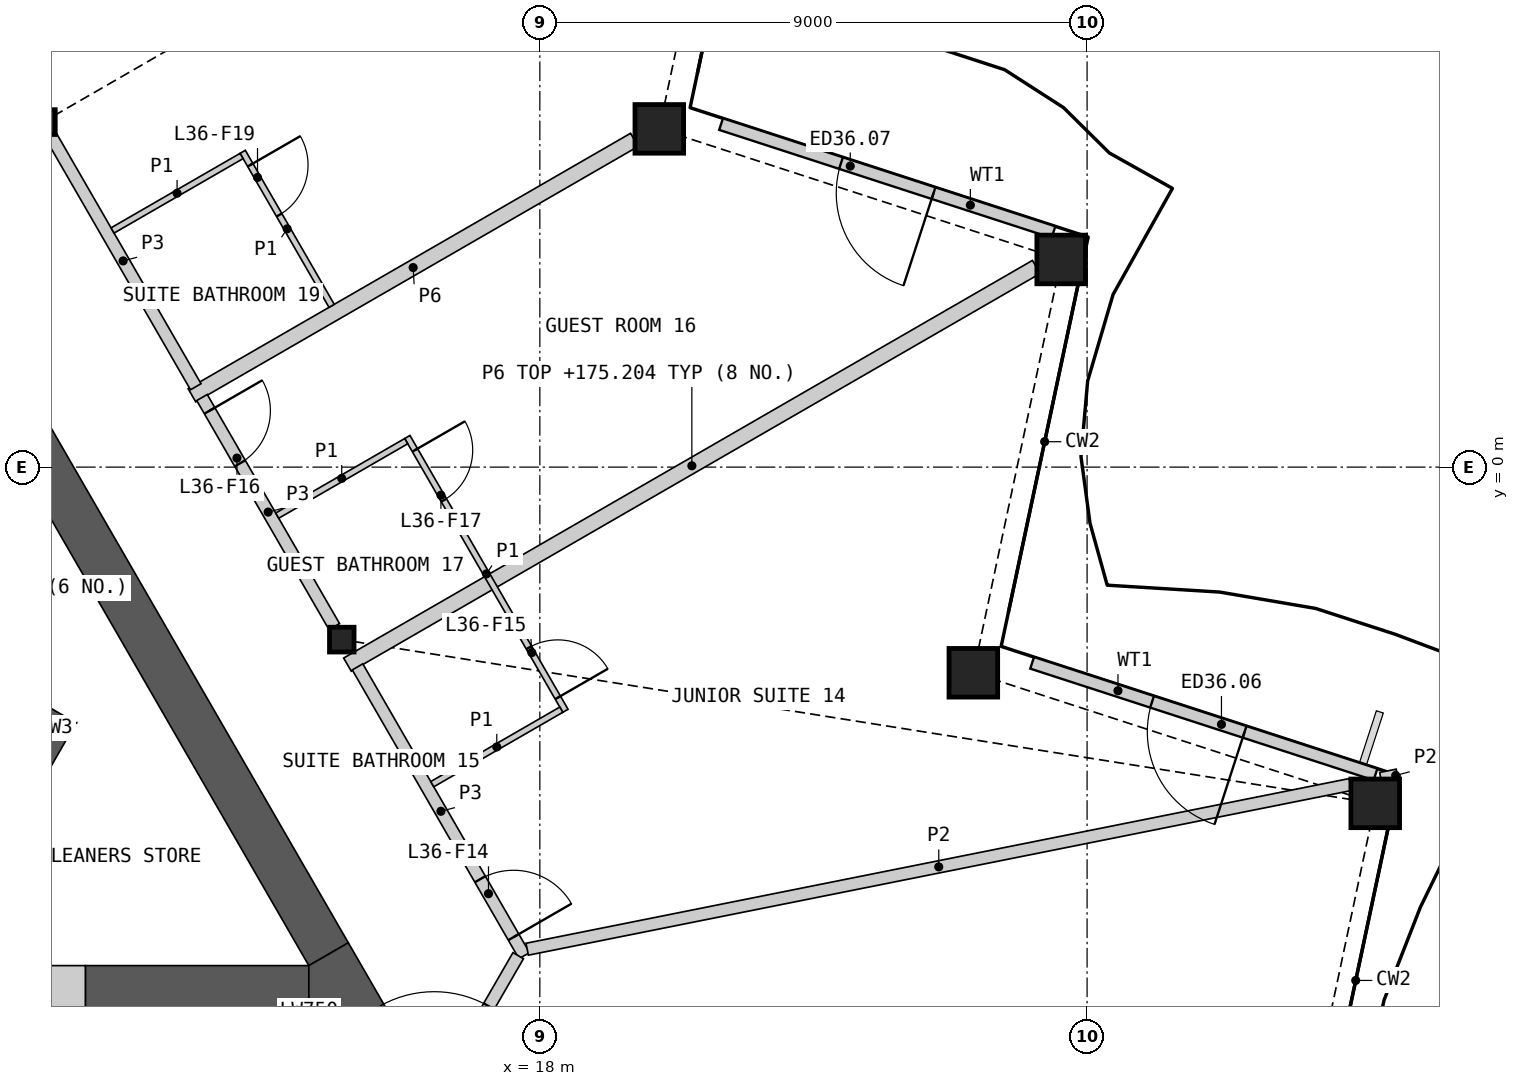
"""IFC4 building model, lengths in metres.
Left out: names, types, materials, properties, quantities, classifications, styles, units other than length and angle.
Written with IfcOpenShell. Run it as: python <this file> out.ifc"""

import sys

from ifc_helpers import new_model, si_unit, direction, frame, frame_2d, origin, origin_2d, place, context, subcontext, project, spatial, polyline, rectangle, hollow_rectangle, i_section, outline, extrude, element, fill, save


model = new_model("IFC4")
c1 = context("Model", 3, precision=1e-05, world=origin(), true_north=direction((0.0, 1.0)))
c2 = subcontext(c1, "Body", "Model", "MODEL_VIEW")
j1 = project(units=[si_unit("LENGTHUNIT", "METRE"), si_unit("PLANEANGLEUNIT", "RADIAN")], contexts=[c1])
p1 = place(None, origin())
s1 = spatial("IfcSite", under=j1, at=p1, CompositionType="ELEMENT")
p2 = place(p1, origin())
s2 = spatial("IfcBuilding", under=s1, at=p2, CompositionType="ELEMENT")
p3 = place(p2, frame((0.0, 0.0, 172.8)))
s3 = spatial("IfcBuildingStorey", under=s2, at=p3, CompositionType="ELEMENT", Elevation=172.8)
for number, where, z_axis, x_axis in (
    (1, (31.739, -5.53, 0.0), (0.0, 0.0, 1.0), (1.0, 0.0, 0.0)),
    (2, (25.129, -3.383, 0.0), (0.0, 0.0, 1.0), (1.0, 0.0, 0.0)),
    (3, (26.574, 3.415, 0.0), (0.0, 0.0, 1.0), (1.0, 0.0, 0.0)),
    (4, (19.965, 5.563, 0.0), (0.0, 0.0, 1.0), (1.0, 0.0, 0.0)),
):
    element("IfcColumn", number, at=place(p3, frame(where, z_axis=z_axis, x_axis=x_axis)), inside=s3, PredefinedType="COLUMN", context=c2, shape_type="SweptSolid", body=[
        extrude(hollow_rectangle(XDim=0.8, YDim=0.8, WallThickness=0.05, at=origin_2d()), origin(), (0.0, 0.0, 1.0), 3.6),
    ])
for number, where, z_axis, x_axis in (
    (5, (14.743, -2.837, 0.0), (0.0, 0.0, 1.0), (1.0, 0.0, 0.0)),
    (6, (9.828, 5.675, 0.0), (0.0, 0.0, 1.0), (1.0, 0.0, 0.0)),
):
    element("IfcColumn", number, at=place(p3, frame(where, z_axis=z_axis, x_axis=x_axis)), inside=s3, PredefinedType="COLUMN", context=c2, shape_type="SweptSolid", body=[
        extrude(i_section(OverallWidth=0.404, OverallDepth=0.407, WebThickness=0.027, FlangeThickness=0.044, at=origin_2d()), origin(), (0.0, 0.0, 1.0), 3.6),
    ])
p4 = place(p3, frame((31.743, -5.054, 0.0), z_axis=(0.0, 0.0, 1.0), x_axis=(-0.951061260164, 0.309002393867, 0.0)))
e7 = element("IfcWall", 7, at=p4, inside=s3, PredefinedType="SOLIDWALL", context=c2, shape_type="SweptSolid", body=[
    extrude(rectangle(XDim=5.938, YDim=0.2, at=frame_2d((2.969, 0.0))), origin(), (0.0, 0.0, 1.0), 2.701),
])
p5 = place(p4, frame((2.264, 0.0, 0.0)))
e8 = element("IfcOpeningElement", 8, at=p5, cuts=e7, PredefinedType="OPENING", context=c2, shape_type="SweptSolid", body=[
    extrude(rectangle(XDim=1.6, YDim=2.4, at=frame_2d((0.8, 1.2))), frame((0.0, 0.11, 0.0), z_axis=(0.0, -1.0, 0.0), x_axis=(1.0, 0.0, 0.0)), (0.0, 0.0, 1.0), 0.22),
])
p6 = place(p3, frame((26.447, 3.865, 0.0), z_axis=(0.0, 0.0, 1.0), x_axis=(-0.951043432761, 0.309057258453, 0.0)))
e9 = element("IfcWall", 9, at=p6, inside=s3, PredefinedType="SOLIDWALL", context=c2, shape_type="SweptSolid", body=[
    extrude(rectangle(XDim=5.748, YDim=0.2, at=frame_2d((2.874, 0.0))), origin(), (0.0, 0.0, 1.0), 2.701),
])
p7 = place(p6, frame((2.074, 0.0, 0.0)))
e10 = element("IfcOpeningElement", 10, at=p7, cuts=e9, PredefinedType="OPENING", context=c2, shape_type="SweptSolid", body=[
    extrude(rectangle(XDim=1.6, YDim=2.4, at=frame_2d((0.8, 1.2))), frame((0.0, 0.11, 0.0), z_axis=(0.0, -1.0, 0.0), x_axis=(1.0, 0.0, 0.0)), (0.0, 0.0, 1.0), 0.22),
])
p8 = place(p3, origin())
e11 = element("IfcWall", 11, at=p8, inside=s3, PredefinedType="SHEAR", context=c2, shape_type="SweptSolid", body=[
    extrude(outline(polyline([(8.83, -6.881), (10.374, -4.206), (10.032, -4.298), (8.738, -6.539), (8.83, -6.881)])), origin(), (0.0, 0.0, 1.0), 3.25),
])
p9 = place(p3, origin())
e12 = element("IfcWall", 12, at=p9, inside=s3, PredefinedType="SHEAR", context=c2, shape_type="SweptSolid", body=[
    extrude(outline(polyline([(10.032, -4.298), (10.374, -4.206), (5.307, -1.281), (5.182, -1.498), (10.032, -4.298)])), origin(), (0.0, 0.0, 1.0), 3.25),
])
p10 = place(p3, frame((10.525, -8.574, 0.0), z_axis=(0.0, 0.0, 1.0), x_axis=(1.0, 0.0, 0.0)))
e13 = element("IfcWall", 13, at=p10, inside=s3, PredefinedType="SHEAR", context=c2, shape_type="SweptSolid", body=[
    extrude(rectangle(XDim=3.676, YDim=0.75, at=frame_2d((1.838, 0.0))), origin(), (0.0, 0.0, 1.0), 3.25),
])
p11 = place(p3, frame((14.526, -8.011, 0.0), z_axis=(0.0, 0.0, 1.0), x_axis=(-0.499994855372, 0.866028374016, 0.0)))
e14 = element("IfcWall", 14, at=p11, inside=s3, PredefinedType="SHEAR", context=c2, shape_type="SweptSolid", body=[
    extrude(rectangle(XDim=14.301, YDim=0.75, at=frame_2d((7.15, 0.0))), origin(), (0.0, 0.0, 1.0), 3.25),
])
p12 = place(p3, origin())
e15 = element("IfcWall", 15, at=p12, inside=s3, PredefinedType="SHEAR", context=c2, shape_type="SweptSolid", body=[
    extrude(outline(polyline([(14.201, -8.949), (14.201, -8.199), (14.851, -7.824), (15.5, -8.949), (14.201, -8.949)])), origin(), (0.0, 0.0, 1.0), 3.25),
])
p13 = place(p3, frame((8.325, -8.574, 0.0), z_axis=(0.0, 0.0, 1.0), x_axis=(1.0, 0.0, 0.0)))
e16 = element("IfcWall", 16, at=p13, inside=s3, PredefinedType="SHEAR", context=c2, shape_type="SweptSolid", body=[
    extrude(rectangle(XDim=2.2, YDim=0.75, at=frame_2d((1.1, 0.0))), origin(), (0.0, 0.0, 1.0), 3.25),
])
p14 = place(p13, frame((0.6, 0.0, 0.0)))
e17 = element("IfcOpeningElement", 17, at=p14, cuts=e16, PredefinedType="OPENING", context=c2, shape_type="SweptSolid", body=[
    extrude(rectangle(XDim=1.0, YDim=2.1, at=frame_2d((0.5, 1.05))), frame((0.0, 0.385, 0.0), z_axis=(0.0, -1.0, 0.0), x_axis=(1.0, 0.0, 0.0)), (0.0, 0.0, 1.0), 0.77),
])
p15 = place(p3, frame((14.836, -3.249, 0.0), z_axis=(0.0, 0.0, 1.0), x_axis=(0.866022412254, 0.500005181446, 0.0)))
e18 = element("IfcWall", 18, at=p15, inside=s3, PredefinedType="PARTITIONING", context=c2, shape_type="SweptSolid", body=[
    extrude(rectangle(XDim=13.081, YDim=0.25, at=frame_2d((6.541, 0.0))), origin(), (0.0, 0.0, 1.0), 2.404),
])
p16 = place(p3, frame((12.278, 1.182, 0.0), z_axis=(0.0, 0.0, 1.0), x_axis=(0.866024457297, 0.500001639361, 0.0)))
e19 = element("IfcWall", 19, at=p16, inside=s3, PredefinedType="PARTITIONING", context=c2, shape_type="SweptSolid", body=[
    extrude(rectangle(XDim=8.402, YDim=0.25, at=frame_2d((4.201, 0.0))), origin(), (0.0, 0.0, 1.0), 2.404),
])
p17 = place(p3, frame((15.002, -3.286, 0.0), z_axis=(0.0, 0.0, 1.0), x_axis=(0.500007607708, -0.866021011428, 0.0)))
e20 = element("IfcWall", 20, at=p17, inside=s3, PredefinedType="PARTITIONING", context=c2, shape_type="SweptSolid", body=[
    extrude(rectangle(XDim=5.484, YDim=0.2, at=frame_2d((2.742, 0.0))), origin(), (0.0, 0.0, 1.0), 3.25),
])
p18 = place(p17, frame((4.032, 0.0, 0.0)))
e21 = element("IfcOpeningElement", 21, at=p18, cuts=e20, PredefinedType="OPENING", context=c2, shape_type="SweptSolid", body=[
    extrude(rectangle(XDim=1.1, YDim=2.1, at=frame_2d((0.55, 1.05))), frame((0.0, 0.11, 0.0), z_axis=(0.0, -1.0, 0.0), x_axis=(1.0, 0.0, 0.0)), (0.0, 0.0, 1.0), 0.22),
])
p19 = place(p3, frame((9.952, 5.461, 0.0), z_axis=(0.0, 0.0, 1.0), x_axis=(0.499990736708, -0.866030751883, 0.0)))
e22 = element("IfcWall", 22, at=p19, inside=s3, PredefinedType="PARTITIONING", context=c2, shape_type="SweptSolid", body=[
    extrude(rectangle(XDim=4.779, YDim=0.2, at=frame_2d((2.389, 0.0))), origin(), (0.0, 0.0, 1.0), 3.25),
])
p20 = place(p3, frame((12.444, 1.145, 0.0), z_axis=(0.0, 0.0, 1.0), x_axis=(0.500007404367, -0.866021128829, 0.0)))
e23 = element("IfcWall", 23, at=p20, inside=s3, PredefinedType="PARTITIONING", context=c2, shape_type="SweptSolid", body=[
    extrude(rectangle(XDim=4.351, YDim=0.2, at=frame_2d((2.176, 0.0))), origin(), (0.0, 0.0, 1.0), 3.25),
])
p21 = place(p20, frame((0.25, 0.0, 0.0)))
e24 = element("IfcOpeningElement", 24, at=p21, cuts=e23, PredefinedType="OPENING", context=c2, shape_type="SweptSolid", body=[
    extrude(rectangle(XDim=1.0, YDim=2.1, at=frame_2d((0.5, 1.05))), frame((0.0, 0.11, 0.0), z_axis=(0.0, -1.0, 0.0), x_axis=(1.0, 0.0, 0.0)), (0.0, 0.0, 1.0), 0.22),
])
p22 = place(p3, frame((15.731, -11.349, 0.0), z_axis=(0.0, 0.0, 1.0), x_axis=(0.499961815444, 0.866047448526, 0.0)))
e25 = element("IfcWall", 25, at=p22, inside=s3, PredefinedType="PARTITIONING", context=c2, shape_type="SweptSolid", body=[
    extrude(rectangle(XDim=3.826, YDim=0.2, at=frame_2d((1.913, 0.0))), origin(), (0.0, 0.0, 1.0), 3.25),
])
p23 = place(p22, frame((1.064, 0.0, 0.0)))
e26 = element("IfcOpeningElement", 26, at=p23, cuts=e25, PredefinedType="OPENING", context=c2, shape_type="SweptSolid", body=[
    extrude(rectangle(XDim=1.8, YDim=2.1, at=frame_2d((0.9, 1.05))), frame((0.0, 0.11, 0.0), z_axis=(0.0, -1.0, 0.0), x_axis=(1.0, 0.0, 0.0)), (0.0, 0.0, 1.0), 0.22),
])
p24 = place(p3, frame((17.792, -7.929, 0.0), z_axis=(0.0, 0.0, 1.0), x_axis=(0.980565709097, 0.196190953266, 0.0)))
e27 = element("IfcWall", 27, at=p24, inside=s3, PredefinedType="PARTITIONING", context=c2, shape_type="SweptSolid", body=[
    extrude(rectangle(XDim=13.805, YDim=0.2, at=frame_2d((6.903, 0.0))), origin(), (0.0, 0.0, 1.0), 2.404),
])
p25 = place(p3, frame((31.831, -5.12, 0.0), z_axis=(0.0, 0.0, 1.0), x_axis=(0.980512850695, 0.19645495571, 0.0)))
e28 = element("IfcWall", 28, at=p25, inside=s3, PredefinedType="PARTITIONING", context=c2, shape_type="SweptSolid", body=[
    extrude(rectangle(XDim=0.277, YDim=0.2, at=frame_2d((0.139, 0.0))), origin(), (0.0, 0.0, 1.0), 2.404),
])
p26 = place(p3, frame((15.821, 0.495, 0.0), z_axis=(0.0, 0.0, 1.0), x_axis=(0.500006934395, -0.866021400173, 0.0)))
e29 = element("IfcWall", 29, at=p26, inside=s3, PredefinedType="PARTITIONING", context=c2, shape_type="SweptSolid", body=[
    extrude(rectangle(XDim=5.2, YDim=0.1, at=frame_2d((2.6, 0.0))), origin(), (0.0, 0.0, 1.0), 2.404),
])
p27 = place(p26, frame((4.0, 0.0, 0.0)))
e30 = element("IfcOpeningElement", 30, at=p27, cuts=e29, PredefinedType="OPENING", context=c2, shape_type="SweptSolid", body=[
    extrude(rectangle(XDim=0.95, YDim=2.1, at=frame_2d((0.475, 1.05))), frame((0.0, 0.06, 0.0), z_axis=(0.0, -1.0, 0.0), x_axis=(1.0, 0.0, 0.0)), (0.0, 0.0, 1.0), 0.12),
])
p28 = place(p26, frame((0.25, 0.0, 0.0)))
e31 = element("IfcOpeningElement", 31, at=p28, cuts=e29, PredefinedType="OPENING", context=c2, shape_type="SweptSolid", body=[
    extrude(rectangle(XDim=0.95, YDim=2.1, at=frame_2d((0.475, 1.05))), frame((0.0, 0.06, 0.0), z_axis=(0.0, -1.0, 0.0), x_axis=(1.0, 0.0, 0.0)), (0.0, 0.0, 1.0), 0.12),
])
p29 = place(p3, frame((13.113, 5.186, 0.0), z_axis=(0.0, 0.0, 1.0), x_axis=(0.499963291492, -0.866046596414, 0.0)))
e32 = element("IfcWall", 32, at=p29, inside=s3, PredefinedType="PARTITIONING", context=c2, shape_type="SweptSolid", body=[
    extrude(rectangle(XDim=2.925, YDim=0.1, at=frame_2d((1.462, 0.0))), origin(), (0.0, 0.0, 1.0), 2.404),
])
p30 = place(p29, frame((0.25, 0.0, 0.0)))
e33 = element("IfcOpeningElement", 33, at=p30, cuts=e32, PredefinedType="OPENING", context=c2, shape_type="SweptSolid", body=[
    extrude(rectangle(XDim=0.95, YDim=2.1, at=frame_2d((0.475, 1.05))), frame((0.0, 0.06, 0.0), z_axis=(0.0, -1.0, 0.0), x_axis=(1.0, 0.0, 0.0)), (0.0, 0.0, 1.0), 0.12),
])
p31 = place(p3, frame((16.231, -5.215, 0.0), z_axis=(0.0, 0.0, 1.0), x_axis=(0.866057815567, 0.499943856944, 0.0)))
e34 = element("IfcWall", 34, at=p31, inside=s3, PredefinedType="PARTITIONING", context=c2, shape_type="SweptSolid", body=[
    extrude(rectangle(XDim=2.45, YDim=0.1, at=frame_2d((1.225, 0.0))), origin(), (0.0, 0.0, 1.0), 2.404),
])
p32 = place(p3, frame((13.681, -0.798, 0.0), z_axis=(0.0, 0.0, 1.0), x_axis=(0.866032905446, 0.499987006516, 0.0)))
e35 = element("IfcWall", 35, at=p32, inside=s3, PredefinedType="PARTITIONING", context=c2, shape_type="SweptSolid", body=[
    extrude(rectangle(XDim=2.45, YDim=0.1, at=frame_2d((1.225, 0.0))), origin(), (0.0, 0.0, 1.0), 2.404),
])
p33 = place(p3, frame((10.973, 3.892, 0.0), z_axis=(0.0, 0.0, 1.0), x_axis=(0.866014668023, 0.500018594424, 0.0)))
e36 = element("IfcWall", 36, at=p33, inside=s3, PredefinedType="PARTITIONING", context=c2, shape_type="SweptSolid", body=[
    extrude(rectangle(XDim=2.45, YDim=0.1, at=frame_2d((1.225, 0.0))), origin(), (0.0, 0.0, 1.0), 2.404),
])
p34 = place(p5, origin())
e37 = element("IfcDoor", 37, at=p34, inside=s3, OperationType="DOUBLE_DOOR_SINGLE_SWING", PredefinedType="DOOR", context=c2, shape_type="SweptSolid", body=[
    extrude(rectangle(XDim=1.6, YDim=2.4, at=frame_2d((0.8, 1.2))), frame((0.0, 0.025, 0.0), z_axis=(0.0, -1.0, 0.0), x_axis=(1.0, 0.0, 0.0)), (0.0, 0.0, 1.0), 0.05),
])
fill(e8, e37)
p35 = place(p7, origin())
e38 = element("IfcDoor", 38, at=p35, inside=s3, OperationType="DOUBLE_DOOR_SINGLE_SWING", PredefinedType="DOOR", context=c2, shape_type="SweptSolid", body=[
    extrude(rectangle(XDim=1.6, YDim=2.4, at=frame_2d((0.8, 1.2))), frame((0.0, 0.025, 0.0), z_axis=(0.0, -1.0, 0.0), x_axis=(1.0, 0.0, 0.0)), (0.0, 0.0, 1.0), 0.05),
])
fill(e10, e38)
p36 = place(p23, origin())
e39 = element("IfcDoor", 39, at=p36, inside=s3, OperationType="DOUBLE_DOOR_SINGLE_SWING", PredefinedType="DOOR", context=c2, shape_type="SweptSolid", body=[
    extrude(rectangle(XDim=1.8, YDim=2.1, at=frame_2d((0.9, 1.05))), frame((0.0, 0.025, 0.0), z_axis=(0.0, -1.0, 0.0), x_axis=(1.0, 0.0, 0.0)), (0.0, 0.0, 1.0), 0.05),
])
fill(e26, e39)
p37 = place(p18, origin())
e40 = element("IfcDoor", 40, at=p37, inside=s3, OperationType="SINGLE_SWING_RIGHT", PredefinedType="DOOR", context=c2, shape_type="SweptSolid", body=[
    extrude(rectangle(XDim=1.1, YDim=2.1, at=frame_2d((0.55, 1.05))), frame((0.0, 0.025, 0.0), z_axis=(0.0, -1.0, 0.0), x_axis=(1.0, 0.0, 0.0)), (0.0, 0.0, 1.0), 0.05),
])
fill(e21, e40)
p38 = place(p27, origin())
e41 = element("IfcDoor", 41, at=p38, inside=s3, OperationType="SINGLE_SWING_RIGHT", PredefinedType="DOOR", context=c2, shape_type="SweptSolid", body=[
    extrude(rectangle(XDim=0.95, YDim=2.1, at=frame_2d((0.475, 1.05))), frame((0.0, 0.025, 0.0), z_axis=(0.0, -1.0, 0.0), x_axis=(1.0, 0.0, 0.0)), (0.0, 0.0, 1.0), 0.05),
])
fill(e30, e41)
p39 = place(p21, origin())
e42 = element("IfcDoor", 42, at=p39, inside=s3, OperationType="SINGLE_SWING_LEFT", PredefinedType="DOOR", context=c2, shape_type="SweptSolid", body=[
    extrude(rectangle(XDim=1.0, YDim=2.1, at=frame_2d((0.5, 1.05))), frame((0.0, 0.025, 0.0), z_axis=(0.0, -1.0, 0.0), x_axis=(1.0, 0.0, 0.0)), (0.0, 0.0, 1.0), 0.05),
])
fill(e24, e42)
p40 = place(p28, origin())
e43 = element("IfcDoor", 43, at=p40, inside=s3, OperationType="SINGLE_SWING_LEFT", PredefinedType="DOOR", context=c2, shape_type="SweptSolid", body=[
    extrude(rectangle(XDim=0.95, YDim=2.1, at=frame_2d((0.475, 1.05))), frame((0.0, 0.025, 0.0), z_axis=(0.0, -1.0, 0.0), x_axis=(1.0, 0.0, 0.0)), (0.0, 0.0, 1.0), 0.05),
])
fill(e31, e43)
p41 = place(p30, origin())
e44 = element("IfcDoor", 44, at=p41, inside=s3, OperationType="SINGLE_SWING_LEFT", PredefinedType="DOOR", context=c2, shape_type="SweptSolid", body=[
    extrude(rectangle(XDim=0.95, YDim=2.1, at=frame_2d((0.475, 1.05))), frame((0.0, 0.025, 0.0), z_axis=(0.0, -1.0, 0.0), x_axis=(1.0, 0.0, 0.0)), (0.0, 0.0, 1.0), 0.05),
])
fill(e33, e44)
save(model, sys.argv[1])
